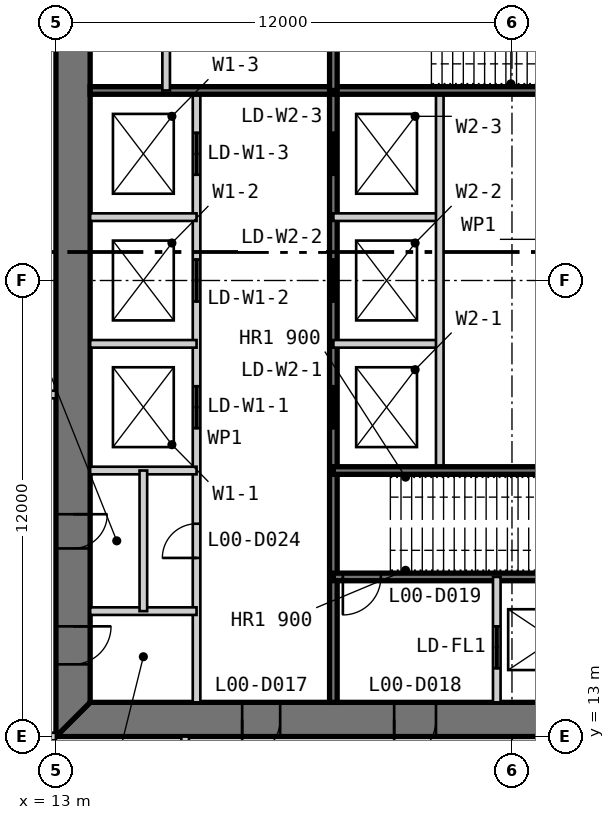
"""IFC4 building model, lengths in metres.
Left out: names, types, materials, properties, quantities, classifications, styles, units other than length and angle.
Written with IfcOpenShell. Run it as: python <this file> out.ifc"""

import sys

from ifc_helpers import new_model, si_unit, direction, frame, frame_2d, origin, place, context, subcontext, project, spatial, polyline, rectangle, outline, extrude, element, fill, save


model = new_model("IFC4")
c1 = context("Model", 3, precision=1e-05, world=origin(), true_north=direction((0.0, 1.0)))
c2 = subcontext(c1, "Body", "Model", "MODEL_VIEW")
j1 = project(units=[si_unit("LENGTHUNIT", "METRE"), si_unit("PLANEANGLEUNIT", "RADIAN")], contexts=[c1])
p1 = place(None, origin())
s1 = spatial("IfcSite", under=j1, at=p1, CompositionType="ELEMENT")
p2 = place(p1, origin())
s2 = spatial("IfcBuilding", under=s1, at=p2, CompositionType="ELEMENT")
p3 = place(p2, origin())
s3 = spatial("IfcBuildingStorey", under=s2, at=p3, CompositionType="ELEMENT", Elevation=0.0)
p4 = place(p3, frame((13.0, 13.45, 0.0), z_axis=(0.0, 0.0, 1.0), x_axis=(1.0, 0.0, 0.0)))
e1 = element("IfcWall", 1, at=p4, inside=s3, PredefinedType="SHEAR", context=c2, shape_type="SweptSolid", body=[
    extrude(outline(polyline([(0.0, -0.45), (24.0, -0.45), (23.1, 0.45), (0.9, 0.45), (0.0, -0.45)])), origin(), (0.0, 0.0, 1.0), 7.0),
])
p5 = place(p4, frame((4.9, 0.0, 0.0)))
e2 = element("IfcOpeningElement", 2, at=p5, cuts=e1, PredefinedType="OPENING", context=c2, shape_type="SweptSolid", body=[
    extrude(rectangle(XDim=1.0, YDim=2.2, at=frame_2d((0.5, 1.1))), frame((0.0, 0.46, 0.0), z_axis=(0.0, -1.0, 0.0), x_axis=(1.0, 0.0, 0.0)), (0.0, 0.0, 1.0), 0.92),
])
p6 = place(p4, frame((8.9, 0.0, 0.0)))
e3 = element("IfcOpeningElement", 3, at=p6, cuts=e1, PredefinedType="OPENING", context=c2, shape_type="SweptSolid", body=[
    extrude(rectangle(XDim=1.1, YDim=2.2, at=frame_2d((0.55, 1.1))), frame((0.0, 0.46, 0.0), z_axis=(0.0, -1.0, 0.0), x_axis=(1.0, 0.0, 0.0)), (0.0, 0.0, 1.0), 0.92),
])
p7 = place(p4, frame((15.05, 0.0, 0.0)))
e4 = element("IfcOpeningElement", 4, at=p7, cuts=e1, PredefinedType="OPENING", context=c2, shape_type="SweptSolid", body=[
    extrude(rectangle(XDim=0.9, YDim=2.2, at=frame_2d((0.45, 1.1))), frame((0.0, 0.46, 0.0), z_axis=(0.0, -1.0, 0.0), x_axis=(1.0, 0.0, 0.0)), (0.0, 0.0, 1.0), 0.92),
])
p8 = place(p4, frame((17.9, 0.0, 0.0)))
e5 = element("IfcOpeningElement", 5, at=p8, cuts=e1, PredefinedType="OPENING", context=c2, shape_type="SweptSolid", body=[
    extrude(rectangle(XDim=1.0, YDim=2.2, at=frame_2d((0.5, 1.1))), frame((0.0, 0.46, 0.0), z_axis=(0.0, -1.0, 0.0), x_axis=(1.0, 0.0, 0.0)), (0.0, 0.0, 1.0), 0.92),
])
p9 = place(p4, frame((21.4, 0.0, 0.0)))
e6 = element("IfcOpeningElement", 6, at=p9, cuts=e1, PredefinedType="OPENING", context=c2, shape_type="SweptSolid", body=[
    extrude(rectangle(XDim=1.0, YDim=2.2, at=frame_2d((0.5, 1.1))), frame((0.0, 0.46, 0.0), z_axis=(0.0, -1.0, 0.0), x_axis=(1.0, 0.0, 0.0)), (0.0, 0.0, 1.0), 0.92),
])
p10 = place(p3, frame((13.45, 36.1, 0.0), z_axis=(0.0, 0.0, 1.0), x_axis=(0.0, -1.0, 0.0)))
e7 = element("IfcWall", 7, at=p10, inside=s3, PredefinedType="SHEAR", context=c2, shape_type="SweptSolid", body=[
    extrude(outline(polyline([(-0.9, -0.45), (23.1, -0.45), (22.2, 0.45), (0.0, 0.45), (-0.9, -0.45)])), origin(), (0.0, 0.0, 1.0), 7.0),
])
p11 = place(p10, frame((20.2, 0.0, 0.0)))
e8 = element("IfcOpeningElement", 8, at=p11, cuts=e7, PredefinedType="OPENING", context=c2, shape_type="SweptSolid", body=[
    extrude(rectangle(XDim=1.0, YDim=2.2, at=frame_2d((0.5, 1.1))), frame((0.0, 0.46, 0.0), z_axis=(0.0, -1.0, 0.0), x_axis=(1.0, 0.0, 0.0)), (0.0, 0.0, 1.0), 0.92),
])
p12 = place(p10, frame((17.25, 0.0, 0.0)))
e9 = element("IfcOpeningElement", 9, at=p12, cuts=e7, PredefinedType="OPENING", context=c2, shape_type="SweptSolid", body=[
    extrude(rectangle(XDim=0.9, YDim=2.2, at=frame_2d((0.45, 1.1))), frame((0.0, 0.46, 0.0), z_axis=(0.0, -1.0, 0.0), x_axis=(1.0, 0.0, 0.0)), (0.0, 0.0, 1.0), 0.92),
])
p13 = place(p3, frame((16.7, 13.9, 0.0), z_axis=(0.0, 0.0, 1.0), x_axis=(0.0, 1.0, 0.0)))
e10 = element("IfcWall", 10, at=p13, inside=s3, PredefinedType="PARTITIONING", context=c2, shape_type="SweptSolid", body=[
    extrude(rectangle(XDim=16.1, YDim=0.2, at=frame_2d((8.05, 0.0))), origin(), (0.0, 0.0, 1.0), 6.8),
])
p14 = place(p13, frame((3.8, 0.0, 0.0)))
e11 = element("IfcOpeningElement", 11, at=p14, cuts=e10, PredefinedType="OPENING", context=c2, shape_type="SweptSolid", body=[
    extrude(rectangle(XDim=0.9, YDim=2.2, at=frame_2d((0.45, 1.1))), frame((0.0, 0.11, 0.0), z_axis=(0.0, -1.0, 0.0), x_axis=(1.0, 0.0, 0.0)), (0.0, 0.0, 1.0), 0.22),
])
p15 = place(p13, frame((7.217, 0.0, 0.0)))
e12 = element("IfcOpeningElement", 12, at=p15, cuts=e10, PredefinedType="OPENING", context=c2, shape_type="SweptSolid", body=[
    extrude(rectangle(XDim=1.1, YDim=2.2, at=frame_2d((0.55, 1.1))), frame((0.0, 0.11, 0.0), z_axis=(0.0, -1.0, 0.0), x_axis=(1.0, 0.0, 0.0)), (0.0, 0.0, 1.0), 0.22),
])
p16 = place(p13, frame((10.55, 0.0, 0.0)))
e13 = element("IfcOpeningElement", 13, at=p16, cuts=e10, PredefinedType="OPENING", context=c2, shape_type="SweptSolid", body=[
    extrude(rectangle(XDim=1.1, YDim=2.2, at=frame_2d((0.55, 1.1))), frame((0.0, 0.11, 0.0), z_axis=(0.0, -1.0, 0.0), x_axis=(1.0, 0.0, 0.0)), (0.0, 0.0, 1.0), 0.22),
])
p17 = place(p13, frame((13.883, 0.0, 0.0)))
e14 = element("IfcOpeningElement", 14, at=p17, cuts=e10, PredefinedType="OPENING", context=c2, shape_type="SweptSolid", body=[
    extrude(rectangle(XDim=1.1, YDim=2.2, at=frame_2d((0.55, 1.1))), frame((0.0, 0.11, 0.0), z_axis=(0.0, -1.0, 0.0), x_axis=(1.0, 0.0, 0.0)), (0.0, 0.0, 1.0), 0.22),
])
p18 = place(p3, frame((20.3, 13.9, 0.0), z_axis=(0.0, 0.0, 1.0), x_axis=(0.0, 1.0, 0.0)))
e15 = element("IfcWall", 15, at=p18, inside=s3, PredefinedType="SOLIDWALL", context=c2, shape_type="SweptSolid", body=[
    extrude(rectangle(XDim=16.1, YDim=0.2, at=frame_2d((8.05, 0.0))), origin(), (0.0, 0.0, 1.0), 6.8),
])
p19 = place(p18, frame((7.217, 0.0, 0.0)))
e16 = element("IfcOpeningElement", 16, at=p19, cuts=e15, PredefinedType="OPENING", context=c2, shape_type="SweptSolid", body=[
    extrude(rectangle(XDim=1.1, YDim=2.2, at=frame_2d((0.55, 1.1))), frame((0.0, 0.11, 0.0), z_axis=(0.0, -1.0, 0.0), x_axis=(1.0, 0.0, 0.0)), (0.0, 0.0, 1.0), 0.22),
])
p20 = place(p18, frame((10.55, 0.0, 0.0)))
e17 = element("IfcOpeningElement", 17, at=p20, cuts=e15, PredefinedType="OPENING", context=c2, shape_type="SweptSolid", body=[
    extrude(rectangle(XDim=1.1, YDim=2.2, at=frame_2d((0.55, 1.1))), frame((0.0, 0.11, 0.0), z_axis=(0.0, -1.0, 0.0), x_axis=(1.0, 0.0, 0.0)), (0.0, 0.0, 1.0), 0.22),
])
p21 = place(p18, frame((13.883, 0.0, 0.0)))
e18 = element("IfcOpeningElement", 18, at=p21, cuts=e15, PredefinedType="OPENING", context=c2, shape_type="SweptSolid", body=[
    extrude(rectangle(XDim=1.1, YDim=2.2, at=frame_2d((0.55, 1.1))), frame((0.0, 0.11, 0.0), z_axis=(0.0, -1.0, 0.0), x_axis=(1.0, 0.0, 0.0)), (0.0, 0.0, 1.0), 0.22),
])
for number, where, z_axis, x_axis in (
    (19, (13.9, 20.0, 0.0), (0.0, 0.0, 1.0), (1.0, 0.0, 0.0)),
    (20, (13.9, 23.333, 0.0), (0.0, 0.0, 1.0), (1.0, 0.0, 0.0)),
    (21, (13.9, 26.667, 0.0), (0.0, 0.0, 1.0), (1.0, 0.0, 0.0)),
    (22, (20.3, 23.333, 0.0), (0.0, 0.0, 1.0), (1.0, 0.0, 0.0)),
    (23, (20.3, 26.667, 0.0), (0.0, 0.0, 1.0), (1.0, 0.0, 0.0)),
):
    element("IfcWall", number, at=place(p3, frame(where, z_axis=z_axis, x_axis=x_axis)), inside=s3, PredefinedType="PARTITIONING", context=c2, shape_type="SweptSolid", body=[
        extrude(rectangle(XDim=2.8, YDim=0.2, at=frame_2d((1.4, 0.0))), origin(), (0.0, 0.0, 1.0), 6.8),
    ])
p22 = place(p3, frame((23.1, 20.0, 0.0), z_axis=(0.0, 0.0, 1.0), x_axis=(0.0, 1.0, 0.0)))
e24 = element("IfcWall", 24, at=p22, inside=s3, PredefinedType="PARTITIONING", context=c2, shape_type="SweptSolid", body=[
    extrude(rectangle(XDim=10.0, YDim=0.2, at=frame_2d((5.0, 0.0))), origin(), (0.0, 0.0, 1.0), 6.8),
])
p23 = place(p3, frame((20.3, 17.2, 0.0), z_axis=(0.0, 0.0, 1.0), x_axis=(1.0, 0.0, 0.0)))
e25 = element("IfcWall", 25, at=p23, inside=s3, PredefinedType="SOLIDWALL", context=c2, shape_type="SweptSolid", body=[
    extrude(rectangle(XDim=9.4, YDim=0.2, at=frame_2d((4.7, 0.0))), origin(), (0.0, 0.0, 1.0), 6.8),
])
p24 = place(p23, frame((0.25, 0.0, 0.0)))
e26 = element("IfcOpeningElement", 26, at=p24, cuts=e25, PredefinedType="OPENING", context=c2, shape_type="SweptSolid", body=[
    extrude(rectangle(XDim=1.0, YDim=2.2, at=frame_2d((0.5, 1.1))), frame((0.0, 0.11, 0.0), z_axis=(0.0, -1.0, 0.0), x_axis=(1.0, 0.0, 0.0)), (0.0, 0.0, 1.0), 0.22),
])
p25 = place(p3, frame((20.3, 20.0, 0.0), z_axis=(0.0, 0.0, 1.0), x_axis=(1.0, 0.0, 0.0)))
e27 = element("IfcWall", 27, at=p25, inside=s3, PredefinedType="SOLIDWALL", context=c2, shape_type="SweptSolid", body=[
    extrude(rectangle(XDim=15.8, YDim=0.2, at=frame_2d((7.9, 0.0))), origin(), (0.0, 0.0, 1.0), 6.8),
])
p26 = place(p3, frame((24.6, 13.9, 0.0), z_axis=(0.0, 0.0, 1.0), x_axis=(0.0, 1.0, 0.0)))
e28 = element("IfcWall", 28, at=p26, inside=s3, PredefinedType="PARTITIONING", context=c2, shape_type="SweptSolid", body=[
    extrude(rectangle(XDim=3.3, YDim=0.2, at=frame_2d((1.65, 0.0))), origin(), (0.0, 0.0, 1.0), 6.8),
])
p27 = place(p26, frame((0.9, 0.0, 0.0)))
e29 = element("IfcOpeningElement", 29, at=p27, cuts=e28, PredefinedType="OPENING", context=c2, shape_type="SweptSolid", body=[
    extrude(rectangle(XDim=1.1, YDim=2.2, at=frame_2d((0.55, 1.1))), frame((0.0, 0.11, 0.0), z_axis=(0.0, -1.0, 0.0), x_axis=(1.0, 0.0, 0.0)), (0.0, 0.0, 1.0), 0.22),
])
p28 = place(p3, frame((13.9, 16.3, 0.0), z_axis=(0.0, 0.0, 1.0), x_axis=(1.0, 0.0, 0.0)))
e30 = element("IfcWall", 30, at=p28, inside=s3, PredefinedType="PARTITIONING", context=c2, shape_type="SweptSolid", body=[
    extrude(rectangle(XDim=2.8, YDim=0.2, at=frame_2d((1.4, 0.0))), origin(), (0.0, 0.0, 1.0), 6.8),
])
p29 = place(p3, frame((15.3, 16.3, 0.0), z_axis=(0.0, 0.0, 1.0), x_axis=(0.0, 1.0, 0.0)))
e31 = element("IfcWall", 31, at=p29, inside=s3, PredefinedType="PARTITIONING", context=c2, shape_type="SweptSolid", body=[
    extrude(rectangle(XDim=3.7, YDim=0.2, at=frame_2d((1.85, 0.0))), origin(), (0.0, 0.0, 1.0), 6.8),
])
p30 = place(p3, frame((29.7, 30.0, 0.0), z_axis=(0.0, 0.0, 1.0), x_axis=(-1.0, 0.0, 0.0)))
e32 = element("IfcWall", 32, at=p30, inside=s3, PredefinedType="SOLIDWALL", context=c2, shape_type="SweptSolid", body=[
    extrude(rectangle(XDim=15.8, YDim=0.2, at=frame_2d((7.9, 0.0))), origin(), (0.0, 0.0, 1.0), 6.8),
])
p31 = place(p3, frame((20.3, 36.1, 0.0), z_axis=(0.0, 0.0, 1.0), x_axis=(0.0, -1.0, 0.0)))
e33 = element("IfcWall", 33, at=p31, inside=s3, PredefinedType="SOLIDWALL", context=c2, shape_type="SweptSolid", body=[
    extrude(rectangle(XDim=6.1, YDim=0.2, at=frame_2d((3.05, 0.0))), origin(), (0.0, 0.0, 1.0), 6.8),
])
p32 = place(p3, frame((15.9, 36.1, 0.0), z_axis=(0.0, 0.0, 1.0), x_axis=(0.0, -1.0, 0.0)))
e34 = element("IfcWall", 34, at=p32, inside=s3, PredefinedType="PARTITIONING", context=c2, shape_type="SweptSolid", body=[
    extrude(rectangle(XDim=6.1, YDim=0.2, at=frame_2d((3.05, 0.0))), origin(), (0.0, 0.0, 1.0), 6.8),
])
p33 = place(p3, frame((16.4, 7.0, 0.0), z_axis=(0.0, 0.0, 1.0), x_axis=(0.0, 1.0, 0.0)))
e35 = element("IfcWall", 35, at=p33, inside=s3, PredefinedType="PARTITIONING", context=c2, shape_type="SweptSolid", body=[
    extrude(rectangle(XDim=6.0, YDim=0.2, at=frame_2d((3.0, 0.0))), origin(), (0.0, 0.0, 1.0), 6.7),
])
p34 = place(p3, frame((7.0, 13.0, 0.0), z_axis=(0.0, 0.0, 1.0), x_axis=(1.0, 0.0, 0.0)))
e36 = element("IfcWall", 36, at=p34, inside=s3, PredefinedType="PARTITIONING", context=c2, shape_type="SweptSolid", body=[
    extrude(rectangle(XDim=6.0, YDim=0.2, at=frame_2d((3.0, 0.0))), origin(), (0.0, 0.0, 1.0), 5.853),
])
p35 = place(p3, frame((7.0, 22.0, 0.0), z_axis=(0.0, 0.0, 1.0), x_axis=(1.0, 0.0, 0.0)))
e37 = element("IfcWall", 37, at=p35, inside=s3, PredefinedType="PARTITIONING", context=c2, shape_type="SweptSolid", body=[
    extrude(rectangle(XDim=6.0, YDim=0.2, at=frame_2d((3.0, 0.0))), origin(), (0.0, 0.0, 1.0), 6.7),
])
p36 = place(p35, frame((2.1, 0.0, 0.0)))
e38 = element("IfcOpeningElement", 38, at=p36, cuts=e37, PredefinedType="OPENING", context=c2, shape_type="SweptSolid", body=[
    extrude(rectangle(XDim=1.8, YDim=2.4, at=frame_2d((0.9, 1.2))), frame((0.0, 0.11, 0.0), z_axis=(0.0, -1.0, 0.0), x_axis=(1.0, 0.0, 0.0)), (0.0, 0.0, 1.0), 0.22),
])
p37 = place(p5, frame((1.0, 0.0, 0.0), z_axis=(0.0, 0.0, 1.0), x_axis=(-1.0, 0.0, 0.0)))
e39 = element("IfcDoor", 39, at=p37, inside=s3, OperationType="SINGLE_SWING_RIGHT", PredefinedType="DOOR", context=c2, shape_type="SweptSolid", body=[
    extrude(rectangle(XDim=1.0, YDim=2.2, at=frame_2d((0.5, 1.1))), frame((0.0, 0.025, 0.0), z_axis=(0.0, -1.0, 0.0), x_axis=(1.0, 0.0, 0.0)), (0.0, 0.0, 1.0), 0.05),
    extrude(outline(polyline([(0.0, 0.0), (0.04, 0.0), (0.04, 2.16), (0.96, 2.16), (0.96, 0.0), (1.0, 0.0), (1.0, 2.2), (0.0, 2.2), (0.0, 0.0)])), frame((0.0, 0.3, 0.0), z_axis=(0.0, -1.0, 0.0), x_axis=(1.0, 0.0, 0.0)), (0.0, 0.0, 1.0), 0.6),
])
fill(e2, e39)
p38 = place(p6, frame((1.1, 0.0, 0.0), z_axis=(0.0, 0.0, 1.0), x_axis=(-1.0, 0.0, 0.0)))
e40 = element("IfcDoor", 40, at=p38, inside=s3, OperationType="SINGLE_SWING_RIGHT", PredefinedType="DOOR", context=c2, shape_type="SweptSolid", body=[
    extrude(rectangle(XDim=1.1, YDim=2.2, at=frame_2d((0.55, 1.1))), frame((0.0, 0.025, 0.0), z_axis=(0.0, -1.0, 0.0), x_axis=(1.0, 0.0, 0.0)), (0.0, 0.0, 1.0), 0.05),
    extrude(outline(polyline([(0.0, 0.0), (0.04, 0.0), (0.04, 2.16), (1.06, 2.16), (1.06, 0.0), (1.1, 0.0), (1.1, 2.2), (0.0, 2.2), (0.0, 0.0)])), frame((0.0, 0.3, 0.0), z_axis=(0.0, -1.0, 0.0), x_axis=(1.0, 0.0, 0.0)), (0.0, 0.0, 1.0), 0.6),
])
fill(e3, e40)
p39 = place(p24, frame((1.0, 0.0, 0.0), z_axis=(0.0, 0.0, 1.0), x_axis=(-1.0, 0.0, 0.0)))
e41 = element("IfcDoor", 41, at=p39, inside=s3, OperationType="SINGLE_SWING_RIGHT", PredefinedType="DOOR", context=c2, shape_type="SweptSolid", body=[
    extrude(rectangle(XDim=1.0, YDim=2.2, at=frame_2d((0.5, 1.1))), frame((0.0, 0.025, 0.0), z_axis=(0.0, -1.0, 0.0), x_axis=(1.0, 0.0, 0.0)), (0.0, 0.0, 1.0), 0.05),
])
fill(e26, e41)
p40 = place(p11, origin())
e42 = element("IfcDoor", 42, at=p40, inside=s3, OperationType="SINGLE_SWING_LEFT", PredefinedType="DOOR", context=c2, shape_type="SweptSolid", body=[
    extrude(rectangle(XDim=1.0, YDim=2.2, at=frame_2d((0.5, 1.1))), frame((0.0, 0.025, 0.0), z_axis=(0.0, -1.0, 0.0), x_axis=(1.0, 0.0, 0.0)), (0.0, 0.0, 1.0), 0.05),
    extrude(outline(polyline([(0.0, 0.0), (0.04, 0.0), (0.04, 2.16), (0.96, 2.16), (0.96, 0.0), (1.0, 0.0), (1.0, 2.2), (0.0, 2.2), (0.0, 0.0)])), frame((0.0, 0.3, 0.0), z_axis=(0.0, -1.0, 0.0), x_axis=(1.0, 0.0, 0.0)), (0.0, 0.0, 1.0), 0.6),
])
fill(e8, e42)
p41 = place(p14, origin())
e43 = element("IfcDoor", 43, at=p41, inside=s3, OperationType="SINGLE_SWING_LEFT", PredefinedType="DOOR", context=c2, shape_type="SweptSolid", body=[
    extrude(rectangle(XDim=0.9, YDim=2.2, at=frame_2d((0.45, 1.1))), frame((0.0, 0.025, 0.0), z_axis=(0.0, -1.0, 0.0), x_axis=(1.0, 0.0, 0.0)), (0.0, 0.0, 1.0), 0.05),
])
fill(e11, e43)
p42 = place(p12, origin())
e44 = element("IfcDoor", 44, at=p42, inside=s3, OperationType="SINGLE_SWING_LEFT", PredefinedType="DOOR", context=c2, shape_type="SweptSolid", body=[
    extrude(rectangle(XDim=0.9, YDim=2.2, at=frame_2d((0.45, 1.1))), frame((0.0, 0.025, 0.0), z_axis=(0.0, -1.0, 0.0), x_axis=(1.0, 0.0, 0.0)), (0.0, 0.0, 1.0), 0.05),
    extrude(outline(polyline([(0.0, 0.0), (0.04, 0.0), (0.04, 2.16), (0.86, 2.16), (0.86, 0.0), (0.9, 0.0), (0.9, 2.2), (0.0, 2.2), (0.0, 0.0)])), frame((0.0, 0.3, 0.0), z_axis=(0.0, -1.0, 0.0), x_axis=(1.0, 0.0, 0.0)), (0.0, 0.0, 1.0), 0.6),
])
fill(e9, e44)
p43 = place(p27, origin())
e45 = element("IfcDoor", 45, at=p43, inside=s3, OperationType="DOUBLE_DOOR_SLIDING", PredefinedType="DOOR", context=c2, shape_type="SweptSolid", body=[
    extrude(rectangle(XDim=1.1, YDim=2.2, at=frame_2d((0.55, 1.1))), frame((0.0, 0.025, 0.0), z_axis=(0.0, -1.0, 0.0), x_axis=(1.0, 0.0, 0.0)), (0.0, 0.0, 1.0), 0.05),
])
fill(e29, e45)
p44 = place(p15, origin())
e46 = element("IfcDoor", 46, at=p44, inside=s3, OperationType="DOUBLE_DOOR_SLIDING", PredefinedType="DOOR", context=c2, shape_type="SweptSolid", body=[
    extrude(rectangle(XDim=1.1, YDim=2.2, at=frame_2d((0.55, 1.1))), frame((0.0, 0.025, 0.0), z_axis=(0.0, -1.0, 0.0), x_axis=(1.0, 0.0, 0.0)), (0.0, 0.0, 1.0), 0.05),
])
fill(e12, e46)
p45 = place(p16, origin())
e47 = element("IfcDoor", 47, at=p45, inside=s3, OperationType="DOUBLE_DOOR_SLIDING", PredefinedType="DOOR", context=c2, shape_type="SweptSolid", body=[
    extrude(rectangle(XDim=1.1, YDim=2.2, at=frame_2d((0.55, 1.1))), frame((0.0, 0.025, 0.0), z_axis=(0.0, -1.0, 0.0), x_axis=(1.0, 0.0, 0.0)), (0.0, 0.0, 1.0), 0.05),
])
fill(e13, e47)
p46 = place(p17, origin())
e48 = element("IfcDoor", 48, at=p46, inside=s3, OperationType="DOUBLE_DOOR_SLIDING", PredefinedType="DOOR", context=c2, shape_type="SweptSolid", body=[
    extrude(rectangle(XDim=1.1, YDim=2.2, at=frame_2d((0.55, 1.1))), frame((0.0, 0.025, 0.0), z_axis=(0.0, -1.0, 0.0), x_axis=(1.0, 0.0, 0.0)), (0.0, 0.0, 1.0), 0.05),
])
fill(e14, e48)
p47 = place(p19, origin())
e49 = element("IfcDoor", 49, at=p47, inside=s3, OperationType="DOUBLE_DOOR_SLIDING", PredefinedType="DOOR", context=c2, shape_type="SweptSolid", body=[
    extrude(rectangle(XDim=1.1, YDim=2.2, at=frame_2d((0.55, 1.1))), frame((0.0, 0.025, 0.0), z_axis=(0.0, -1.0, 0.0), x_axis=(1.0, 0.0, 0.0)), (0.0, 0.0, 1.0), 0.05),
])
fill(e16, e49)
p48 = place(p20, origin())
e50 = element("IfcDoor", 50, at=p48, inside=s3, OperationType="DOUBLE_DOOR_SLIDING", PredefinedType="DOOR", context=c2, shape_type="SweptSolid", body=[
    extrude(rectangle(XDim=1.1, YDim=2.2, at=frame_2d((0.55, 1.1))), frame((0.0, 0.025, 0.0), z_axis=(0.0, -1.0, 0.0), x_axis=(1.0, 0.0, 0.0)), (0.0, 0.0, 1.0), 0.05),
])
fill(e17, e50)
p49 = place(p21, origin())
e51 = element("IfcDoor", 51, at=p49, inside=s3, OperationType="DOUBLE_DOOR_SLIDING", PredefinedType="DOOR", context=c2, shape_type="SweptSolid", body=[
    extrude(rectangle(XDim=1.1, YDim=2.2, at=frame_2d((0.55, 1.1))), frame((0.0, 0.025, 0.0), z_axis=(0.0, -1.0, 0.0), x_axis=(1.0, 0.0, 0.0)), (0.0, 0.0, 1.0), 0.05),
])
fill(e18, e51)
save(model, sys.argv[1])
